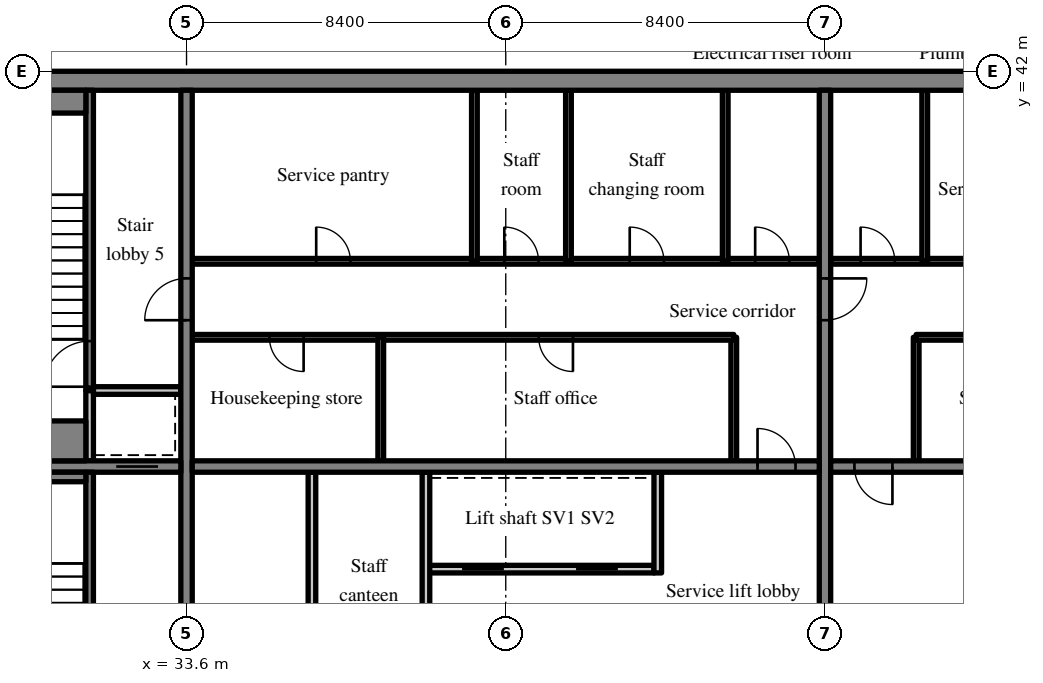
"""IFC4 building model, lengths in metres.
Left out: names, types, materials, properties, quantities, classifications, styles, units other than length and angle.
Written with IfcOpenShell. Run it as: python <this file> out.ifc"""

import sys

from ifc_helpers import new_model, si_unit, direction, frame, frame_2d, origin, place, context, subcontext, project, spatial, rectangle, extrude, source, transform, mapped, element, fill, save


model = new_model("IFC4")
c1 = context("Model", 3, precision=1e-05, world=origin(), true_north=direction((0.0, 1.0)))
c2 = subcontext(c1, "Body", "Model", "MODEL_VIEW")
j1 = project(units=[si_unit("LENGTHUNIT", "METRE"), si_unit("PLANEANGLEUNIT", "RADIAN")], contexts=[c1])
p1 = place(None, origin())
s1 = spatial("IfcSite", under=j1, at=p1, CompositionType="ELEMENT")
p2 = place(p1, origin())
s2 = spatial("IfcBuilding", under=s1, at=p2, CompositionType="ELEMENT")
p3 = place(p2, frame((0.0, 0.0, 289.7)))
s3 = spatial("IfcBuildingStorey", under=s2, at=p3, CompositionType="ELEMENT", Elevation=289.7)
m1 = source(origin(), c2, "Body", "SweptSolid", [
    extrude(rectangle(XDim=50.4, YDim=0.5, at=frame_2d((25.2, 0.0))), origin(), (0.0, 0.0, 1.0), 3.72),
])
p4 = place(p3, frame((25.2, 41.75, 0.0), z_axis=(0.0, 0.0, 1.0), x_axis=(1.0, 0.0, 0.0)))
e1 = element("IfcWall", 1, at=p4, inside=s3, PredefinedType="SHEAR", context=c2, shape_type="MappedRepresentation", body=[
    mapped(m1, transform((0.0, 0.0, 0.0), scale=1.0)),
])
m2 = source(origin(), c2, "Body", "SweptSolid", [
    extrude(rectangle(XDim=19.0, YDim=0.3, at=frame_2d((9.5, 0.0))), origin(), (0.0, 0.0, 1.0), 3.72),
])
p5 = place(p3, frame((33.6, 22.5, 0.0), z_axis=(0.0, 0.0, 1.0), x_axis=(0.0, 1.0, 0.0)))
e2 = element("IfcWall", 2, at=p5, inside=s3, PredefinedType="SHEAR", context=c2, shape_type="MappedRepresentation", body=[
    mapped(m2, transform((0.0, 0.0, 0.0), scale=1.0)),
])
m3 = source(origin(), c2, "Body", "SweptSolid", [
    extrude(rectangle(XDim=1.1, YDim=2.1, at=frame_2d((0.55, 1.05))), frame((0.0, 0.16, 0.0), z_axis=(0.0, -1.0, 0.0), x_axis=(1.0, 0.0, 0.0)), (0.0, 0.0, 1.0), 0.32),
])
p6 = place(p5, frame((12.95, 0.0, 0.0)))
e3 = element("IfcOpeningElement", 3, at=p6, cuts=e2, PredefinedType="OPENING", context=c2, shape_type="MappedRepresentation", body=[
    mapped(m3, transform((0.0, 0.0, 0.0), scale=1.0)),
])
p7 = place(p3, frame((50.4, 22.5, 0.0), z_axis=(0.0, 0.0, 1.0), x_axis=(0.0, 1.0, 0.0)))
e4 = element("IfcWall", 4, at=p7, inside=s3, PredefinedType="SHEAR", context=c2, shape_type="MappedRepresentation", body=[
    mapped(m2, transform((0.0, 0.0, 0.0), scale=1.0)),
])
p8 = place(p7, frame((12.95, 0.0, 0.0)))
e5 = element("IfcOpeningElement", 5, at=p8, cuts=e4, PredefinedType="OPENING", context=c2, shape_type="MappedRepresentation", body=[
    mapped(m3, transform((0.0, 0.0, 0.0), scale=1.0)),
])
m4 = source(origin(), c2, "Body", "SweptSolid", [
    extrude(rectangle(XDim=7.75, YDim=0.3, at=frame_2d((3.875, 0.0))), origin(), (0.0, 0.0, 1.0), 3.72),
])
p9 = place(p3, frame((25.7, 31.6, 0.0), z_axis=(0.0, 0.0, 1.0), x_axis=(1.0, 0.0, 0.0)))
e6 = element("IfcWall", 6, at=p9, inside=s3, PredefinedType="SHEAR", context=c2, shape_type="MappedRepresentation", body=[
    mapped(m4, transform((0.0, 0.0, 0.0), scale=1.0)),
])
p10 = place(p9, frame((6.05, 0.0, 0.0)))
e7 = element("IfcOpeningElement", 7, at=p10, cuts=e6, PredefinedType="OPENING", context=c2, shape_type="MappedRepresentation", body=[
    mapped(m3, transform((0.0, 0.0, 0.0), scale=1.0)),
])
m5 = source(origin(), c2, "Body", "SweptSolid", [
    extrude(rectangle(XDim=16.5, YDim=0.3, at=frame_2d((8.25, 0.0))), origin(), (0.0, 0.0, 1.0), 3.72),
])
p11 = place(p3, frame((33.75, 31.6, 0.0), z_axis=(0.0, 0.0, 1.0), x_axis=(1.0, 0.0, 0.0)))
e8 = element("IfcWall", 8, at=p11, inside=s3, PredefinedType="SHEAR", context=c2, shape_type="MappedRepresentation", body=[
    mapped(m5, transform((0.0, 0.0, 0.0), scale=1.0)),
])
m6 = source(origin(), c2, "Body", "SweptSolid", [
    extrude(rectangle(XDim=1.0, YDim=2.1, at=frame_2d((0.5, 1.05))), frame((0.0, 0.16, 0.0), z_axis=(0.0, -1.0, 0.0), x_axis=(1.0, 0.0, 0.0)), (0.0, 0.0, 1.0), 0.32),
])
p12 = place(p11, frame((14.875, 0.0, 0.0)))
e9 = element("IfcOpeningElement", 9, at=p12, cuts=e8, PredefinedType="OPENING", context=c2, shape_type="MappedRepresentation", body=[
    mapped(m6, transform((0.0, 0.0, 0.0), scale=1.0)),
])
p13 = place(p3, frame((50.55, 31.6, 0.0), z_axis=(0.0, 0.0, 1.0), x_axis=(1.0, 0.0, 0.0)))
e10 = element("IfcWall", 10, at=p13, inside=s3, PredefinedType="SHEAR", context=c2, shape_type="MappedRepresentation", body=[
    mapped(m5, transform((0.0, 0.0, 0.0), scale=1.0)),
])
p14 = place(p13, frame((0.625, 0.0, 0.0)))
e11 = element("IfcOpeningElement", 11, at=p14, cuts=e10, PredefinedType="OPENING", context=c2, shape_type="MappedRepresentation", body=[
    mapped(m6, transform((0.0, 0.0, 0.0), scale=1.0)),
])
m7 = source(origin(), c2, "Body", "SweptSolid", [
    extrude(rectangle(XDim=6.0, YDim=0.2, at=frame_2d((3.0, 0.0))), origin(), (0.0, 0.0, 1.0), 3.72),
])
p15 = place(p3, frame((39.9, 28.9, 0.0), z_axis=(0.0, 0.0, 1.0), x_axis=(1.0, 0.0, 0.0)))
e12 = element("IfcWall", 12, at=p15, inside=s3, PredefinedType="SOLIDWALL", context=c2, shape_type="MappedRepresentation", body=[
    mapped(m7, transform((0.0, 0.0, 0.0), scale=1.0)),
])
m8 = source(origin(), c2, "Body", "SweptSolid", [
    extrude(rectangle(XDim=1.1, YDim=2.1, at=frame_2d((0.55, 1.05))), frame((0.0, 0.11, 0.0), z_axis=(0.0, -1.0, 0.0), x_axis=(1.0, 0.0, 0.0)), (0.0, 0.0, 1.0), 0.22),
])
p16 = place(p15, frame((0.95, 0.0, 0.0)))
e13 = element("IfcOpeningElement", 13, at=p16, cuts=e12, PredefinedType="OPENING", context=c2, shape_type="MappedRepresentation", body=[
    mapped(m8, transform((0.0, 0.0, 0.0), scale=1.0)),
])
p17 = place(p15, frame((3.95, 0.0, 0.0)))
e14 = element("IfcOpeningElement", 14, at=p17, cuts=e12, PredefinedType="OPENING", context=c2, shape_type="MappedRepresentation", body=[
    mapped(m8, transform((0.0, 0.0, 0.0), scale=1.0)),
])
m9 = source(origin(), c2, "Body", "SweptSolid", [
    extrude(rectangle(XDim=8.95, YDim=0.2, at=frame_2d((4.475, 0.0))), origin(), (0.0, 0.0, 1.0), 3.72),
])
p18 = place(p3, frame((39.9, 22.5, 0.0), z_axis=(0.0, 0.0, 1.0), x_axis=(0.0, 1.0, 0.0)))
e15 = element("IfcWall", 15, at=p18, inside=s3, PredefinedType="PARTITIONING", context=c2, shape_type="MappedRepresentation", body=[
    mapped(m9, transform((0.0, 0.0, 0.0), scale=1.0)),
])
m10 = source(origin(), c2, "Body", "SweptSolid", [
    extrude(rectangle(XDim=0.9, YDim=2.1, at=frame_2d((0.45, 1.05))), frame((0.0, 0.11, 0.0), z_axis=(0.0, -1.0, 0.0), x_axis=(1.0, 0.0, 0.0)), (0.0, 0.0, 1.0), 0.22),
])
p19 = place(p18, frame((4.05, 0.0, 0.0)))
e16 = element("IfcOpeningElement", 16, at=p19, cuts=e15, PredefinedType="OPENING", context=c2, shape_type="MappedRepresentation", body=[
    mapped(m10, transform((0.0, 0.0, 0.0), scale=1.0)),
])
m11 = source(origin(), c2, "Body", "SweptSolid", [
    extrude(rectangle(XDim=2.65, YDim=0.2, at=frame_2d((1.325, 0.0))), origin(), (0.0, 0.0, 1.0), 3.72),
])
p20 = place(p3, frame((46.0, 28.8, 0.0), z_axis=(0.0, 0.0, 1.0), x_axis=(0.0, 1.0, 0.0)))
e17 = element("IfcWall", 17, at=p20, inside=s3, PredefinedType="SOLIDWALL", context=c2, shape_type="MappedRepresentation", body=[
    mapped(m11, transform((0.0, 0.0, 0.0), scale=1.0)),
])
p21 = place(p3, frame((36.9, 22.5, 0.0), z_axis=(0.0, 0.0, 1.0), x_axis=(0.0, 1.0, 0.0)))
e18 = element("IfcWall", 18, at=p21, inside=s3, PredefinedType="PARTITIONING", context=c2, shape_type="MappedRepresentation", body=[
    mapped(m9, transform((0.0, 0.0, 0.0), scale=1.0)),
])
m12 = source(origin(), c2, "Body", "SweptSolid", [
    extrude(rectangle(XDim=3.25, YDim=0.15, at=frame_2d((1.625, 0.0))), origin(), (0.0, 0.0, 1.0), 3.72),
])
p22 = place(p3, frame((48.0, 31.75, 0.0), z_axis=(0.0, 0.0, 1.0), x_axis=(0.0, 1.0, 0.0)))
e19 = element("IfcWall", 19, at=p22, inside=s3, PredefinedType="PARTITIONING", context=c2, shape_type="MappedRepresentation", body=[
    mapped(m12, transform((0.0, 0.0, 0.0), scale=1.0)),
])
m13 = source(origin(), c2, "Body", "SweptSolid", [
    extrude(rectangle(XDim=14.25, YDim=0.15, at=frame_2d((7.125, 0.0))), origin(), (0.0, 0.0, 1.0), 3.72),
])
p23 = place(p3, frame((33.75, 35.0, 0.0), z_axis=(0.0, 0.0, 1.0), x_axis=(1.0, 0.0, 0.0)))
e20 = element("IfcWall", 20, at=p23, inside=s3, PredefinedType="PARTITIONING", context=c2, shape_type="MappedRepresentation", body=[
    mapped(m13, transform((0.0, 0.0, 0.0), scale=1.0)),
])
m14 = source(origin(), c2, "Body", "SweptSolid", [
    extrude(rectangle(XDim=0.9, YDim=2.1, at=frame_2d((0.45, 1.05))), frame((0.0, 0.085, 0.0), z_axis=(0.0, -1.0, 0.0), x_axis=(1.0, 0.0, 0.0)), (0.0, 0.0, 1.0), 0.17),
])
p24 = place(p23, frame((2.031, 0.0, 0.0)))
e21 = element("IfcOpeningElement", 21, at=p24, cuts=e20, PredefinedType="OPENING", context=c2, shape_type="MappedRepresentation", body=[
    mapped(m14, transform((0.0, 0.0, 0.0), scale=1.0)),
])
p25 = place(p23, frame((9.118, 0.0, 0.0)))
e22 = element("IfcOpeningElement", 22, at=p25, cuts=e20, PredefinedType="OPENING", context=c2, shape_type="MappedRepresentation", body=[
    mapped(m14, transform((0.0, 0.0, 0.0), scale=1.0)),
])
m15 = source(origin(), c2, "Body", "SweptSolid", [
    extrude(rectangle(XDim=16.5, YDim=0.15, at=frame_2d((8.25, 0.0))), origin(), (0.0, 0.0, 1.0), 3.72),
])
p26 = place(p3, frame((33.75, 37.0, 0.0), z_axis=(0.0, 0.0, 1.0), x_axis=(1.0, 0.0, 0.0)))
e23 = element("IfcWall", 23, at=p26, inside=s3, PredefinedType="PARTITIONING", context=c2, shape_type="MappedRepresentation", body=[
    mapped(m15, transform((0.0, 0.0, 0.0), scale=1.0)),
])
p27 = place(p26, frame((3.262, 0.0, 0.0)))
e24 = element("IfcOpeningElement", 24, at=p27, cuts=e23, PredefinedType="OPENING", context=c2, shape_type="MappedRepresentation", body=[
    mapped(m14, transform((0.0, 0.0, 0.0), scale=1.0)),
])
p28 = place(p26, frame((8.212, 0.0, 0.0)))
e25 = element("IfcOpeningElement", 25, at=p28, cuts=e23, PredefinedType="OPENING", context=c2, shape_type="MappedRepresentation", body=[
    mapped(m14, transform((0.0, 0.0, 0.0), scale=1.0)),
])
p29 = place(p26, frame((11.512, 0.0, 0.0)))
e26 = element("IfcOpeningElement", 26, at=p29, cuts=e23, PredefinedType="OPENING", context=c2, shape_type="MappedRepresentation", body=[
    mapped(m14, transform((0.0, 0.0, 0.0), scale=1.0)),
])
p30 = place(p26, frame((14.813, 0.0, 0.0)))
e27 = element("IfcOpeningElement", 27, at=p30, cuts=e23, PredefinedType="OPENING", context=c2, shape_type="MappedRepresentation", body=[
    mapped(m14, transform((0.0, 0.0, 0.0), scale=1.0)),
])
p31 = place(p3, frame((38.711, 31.75, 0.0), z_axis=(0.0, 0.0, 1.0), x_axis=(0.0, 1.0, 0.0)))
e28 = element("IfcWall", 28, at=p31, inside=s3, PredefinedType="PARTITIONING", context=c2, shape_type="MappedRepresentation", body=[
    mapped(m12, transform((0.0, 0.0, 0.0), scale=1.0)),
])
m16 = source(origin(), c2, "Body", "SweptSolid", [
    extrude(rectangle(XDim=4.5, YDim=0.15, at=frame_2d((2.25, 0.0))), origin(), (0.0, 0.0, 1.0), 3.72),
])
for number, where, z_axis, x_axis in (
    (29, (41.175, 37.0, 0.0), (0.0, 0.0, 1.0), (0.0, 1.0, 0.0)),
    (30, (43.65, 37.0, 0.0), (0.0, 0.0, 1.0), (0.0, 1.0, 0.0)),
    (31, (47.775, 37.0, 0.0), (0.0, 0.0, 1.0), (0.0, 1.0, 0.0)),
):
    element("IfcWall", number, at=place(p3, frame(where, z_axis=z_axis, x_axis=x_axis)), inside=s3, PredefinedType="PARTITIONING", context=c2, shape_type="MappedRepresentation", body=[
        mapped(m16, transform((0.0, 0.0, 0.0), scale=1.0)),
    ])
p32 = place(p3, frame((52.8, 31.75, 0.0), z_axis=(0.0, 0.0, 1.0), x_axis=(0.0, 1.0, 0.0)))
e32 = element("IfcWall", 32, at=p32, inside=s3, PredefinedType="PARTITIONING", context=c2, shape_type="MappedRepresentation", body=[
    mapped(m12, transform((0.0, 0.0, 0.0), scale=1.0)),
])
p33 = place(p3, frame((67.05, 35.0, 0.0), z_axis=(0.0, 0.0, 1.0), x_axis=(-1.0, 0.0, 0.0)))
e33 = element("IfcWall", 33, at=p33, inside=s3, PredefinedType="PARTITIONING", context=c2, shape_type="MappedRepresentation", body=[
    mapped(m13, transform((0.0, 0.0, 0.0), scale=1.0)),
])
p34 = place(p33, frame((0.968, 0.0, 0.0)))
e34 = element("IfcOpeningElement", 34, at=p34, cuts=e33, PredefinedType="OPENING", context=c2, shape_type="MappedRepresentation", body=[
    mapped(m14, transform((0.0, 0.0, 0.0), scale=1.0)),
])
p35 = place(p33, frame((5.929, 0.0, 0.0)))
e35 = element("IfcOpeningElement", 35, at=p35, cuts=e33, PredefinedType="OPENING", context=c2, shape_type="MappedRepresentation", body=[
    mapped(m14, transform((0.0, 0.0, 0.0), scale=1.0)),
])
p36 = place(p33, frame((11.599, 0.0, 0.0)))
e36 = element("IfcOpeningElement", 36, at=p36, cuts=e33, PredefinedType="OPENING", context=c2, shape_type="MappedRepresentation", body=[
    mapped(m14, transform((0.0, 0.0, 0.0), scale=1.0)),
])
p37 = place(p3, frame((67.05, 37.0, 0.0), z_axis=(0.0, 0.0, 1.0), x_axis=(-1.0, 0.0, 0.0)))
e37 = element("IfcWall", 37, at=p37, inside=s3, PredefinedType="PARTITIONING", context=c2, shape_type="MappedRepresentation", body=[
    mapped(m15, transform((0.0, 0.0, 0.0), scale=1.0)),
])
p38 = place(p37, frame((0.788, 0.0, 0.0)))
e38 = element("IfcOpeningElement", 38, at=p38, cuts=e37, PredefinedType="OPENING", context=c2, shape_type="MappedRepresentation", body=[
    mapped(m14, transform((0.0, 0.0, 0.0), scale=1.0)),
])
p39 = place(p37, frame((3.675, 0.0, 0.0)))
e39 = element("IfcOpeningElement", 39, at=p39, cuts=e37, PredefinedType="OPENING", context=c2, shape_type="MappedRepresentation", body=[
    mapped(m14, transform((0.0, 0.0, 0.0), scale=1.0)),
])
p40 = place(p37, frame((9.45, 0.0, 0.0)))
e40 = element("IfcOpeningElement", 40, at=p40, cuts=e37, PredefinedType="OPENING", context=c2, shape_type="MappedRepresentation", body=[
    mapped(m14, transform((0.0, 0.0, 0.0), scale=1.0)),
])
p41 = place(p37, frame((14.813, 0.0, 0.0)))
e41 = element("IfcOpeningElement", 41, at=p41, cuts=e37, PredefinedType="OPENING", context=c2, shape_type="MappedRepresentation", body=[
    mapped(m14, transform((0.0, 0.0, 0.0), scale=1.0)),
])
p42 = place(p3, frame((53.025, 37.0, 0.0), z_axis=(0.0, 0.0, 1.0), x_axis=(0.0, 1.0, 0.0)))
e42 = element("IfcWall", 42, at=p42, inside=s3, PredefinedType="PARTITIONING", context=c2, shape_type="MappedRepresentation", body=[
    mapped(m16, transform((0.0, 0.0, 0.0), scale=1.0)),
])
m17 = source(origin(), c2, "Body", "SweptSolid", [
    extrude(rectangle(XDim=8.95, YDim=0.2, at=frame_2d((4.475, 0.0))), origin(), (0.0, 0.0, 1.0), 3.72),
])
p43 = place(p3, frame((31.05, 22.5, 0.0), z_axis=(0.0, 0.0, 1.0), x_axis=(0.0, 1.0, 0.0)))
e43 = element("IfcWall", 43, at=p43, inside=s3, PredefinedType="SOLIDWALL", context=c2, shape_type="MappedRepresentation", body=[
    mapped(m17, transform((0.0, 0.0, 0.0), scale=1.0)),
])
m18 = source(origin(), c2, "Body", "SweptSolid", [
    extrude(rectangle(XDim=1.2, YDim=2.1, at=frame_2d((0.6, 1.05))), frame((0.0, 0.11, 0.0), z_axis=(0.0, -1.0, 0.0), x_axis=(1.0, 0.0, 0.0)), (0.0, 0.0, 1.0), 0.22),
])
p44 = place(p43, frame((1.1, 0.0, 0.0)))
e44 = element("IfcOpeningElement", 44, at=p44, cuts=e43, PredefinedType="OPENING", context=c2, shape_type="MappedRepresentation", body=[
    mapped(m18, transform((0.0, 0.0, 0.0), scale=1.0)),
])
m19 = source(origin(), c2, "Body", "SweptSolid", [
    extrude(rectangle(XDim=1.85, YDim=0.2, at=frame_2d((0.925, 0.0))), origin(), (0.0, 0.0, 1.0), 3.72),
])
p45 = place(p3, frame((31.05, 31.75, 0.0), z_axis=(0.0, 0.0, 1.0), x_axis=(0.0, 1.0, 0.0)))
e45 = element("IfcWall", 45, at=p45, inside=s3, PredefinedType="SOLIDWALL", context=c2, shape_type="MappedRepresentation", body=[
    mapped(m19, transform((0.0, 0.0, 0.0), scale=1.0)),
])
m20 = source(origin(), c2, "Body", "SweptSolid", [
    extrude(rectangle(XDim=2.3, YDim=0.2, at=frame_2d((1.15, 0.0))), origin(), (0.0, 0.0, 1.0), 3.72),
])
p46 = place(p3, frame((31.15, 33.6, 0.0), z_axis=(0.0, 0.0, 1.0), x_axis=(1.0, 0.0, 0.0)))
e46 = element("IfcWall", 46, at=p46, inside=s3, PredefinedType="SOLIDWALL", context=c2, shape_type="MappedRepresentation", body=[
    mapped(m20, transform((0.0, 0.0, 0.0), scale=1.0)),
])
m21 = source(origin(), c2, "Body", "SweptSolid", [
    extrude(rectangle(XDim=7.9, YDim=0.2, at=frame_2d((3.95, 0.0))), origin(), (0.0, 0.0, 1.0), 3.72),
])
p47 = place(p3, frame((31.05, 33.6, 0.0), z_axis=(0.0, 0.0, 1.0), x_axis=(0.0, 1.0, 0.0)))
e47 = element("IfcWall", 47, at=p47, inside=s3, PredefinedType="SOLIDWALL", context=c2, shape_type="MappedRepresentation", body=[
    mapped(m21, transform((0.0, 0.0, 0.0), scale=1.0)),
])
p48 = place(p47, frame((0.1, 0.0, 0.0)))
e48 = element("IfcOpeningElement", 48, at=p48, cuts=e47, PredefinedType="OPENING", context=c2, shape_type="MappedRepresentation", body=[
    mapped(m18, transform((0.0, 0.0, 0.0), scale=1.0)),
])
m22 = source(origin(), c2, "Body", "SweptSolid", [
    extrude(rectangle(XDim=5.25, YDim=0.25, at=frame_2d((2.625, 0.0))), origin(), (0.0, 0.0, 1.0), 3.72),
])
p49 = place(p3, frame((25.7, 31.325, 0.0), z_axis=(0.0, 0.0, 1.0), x_axis=(1.0, 0.0, 0.0)))
e49 = element("IfcWall", 49, at=p49, inside=s3, PredefinedType="SOLIDWALL", context=c2, shape_type="MappedRepresentation", body=[
    mapped(m22, transform((0.0, 0.0, 0.0), scale=1.0)),
])
m23 = source(origin(), c2, "Body", "SweptSolid", [
    extrude(rectangle(XDim=5.25, YDim=0.6, at=frame_2d((2.625, 0.0))), origin(), (0.0, 0.0, 1.0), 3.72),
])
p50 = place(p3, frame((25.7, 41.2, 0.0), z_axis=(0.0, 0.0, 1.0), x_axis=(1.0, 0.0, 0.0)))
e50 = element("IfcWall", 50, at=p50, inside=s3, PredefinedType="SOLIDWALL", context=c2, shape_type="MappedRepresentation", body=[
    mapped(m23, transform((0.0, 0.0, 0.0), scale=1.0)),
])
m24 = source(origin(), c2, "Body", "SweptSolid", [
    extrude(rectangle(XDim=5.25, YDim=1.05, at=frame_2d((2.625, 0.0))), origin(), (0.0, 0.0, 1.0), 3.72),
])
p51 = place(p3, frame((25.7, 32.275, 0.0), z_axis=(0.0, 0.0, 1.0), x_axis=(1.0, 0.0, 0.0)))
e51 = element("IfcWall", 51, at=p51, inside=s3, PredefinedType="SOLIDWALL", context=c2, shape_type="MappedRepresentation", body=[
    mapped(m24, transform((0.0, 0.0, 0.0), scale=1.0)),
])
m25 = source(origin(), c2, "Body", "SweptSolid", [
    extrude(rectangle(XDim=1.0, YDim=2.1, at=frame_2d((0.5, 1.05))), frame((0.0, 0.025, 0.0), z_axis=(0.0, -1.0, 0.0), x_axis=(1.0, 0.0, 0.0)), (0.0, 0.0, 1.0), 0.05),
])
p52 = place(p12, origin())
e52 = element("IfcDoor", 52, at=p52, inside=s3, OperationType="SINGLE_SWING_LEFT", PredefinedType="DOOR", context=c2, shape_type="MappedRepresentation", body=[
    mapped(m25, transform((0.0, 0.0, 0.0), scale=1.0)),
])
fill(e9, e52)
m26 = source(origin(), c2, "Body", "SweptSolid", [
    extrude(rectangle(XDim=1.1, YDim=2.1, at=frame_2d((0.55, 1.05))), frame((0.0, 0.025, 0.0), z_axis=(0.0, -1.0, 0.0), x_axis=(1.0, 0.0, 0.0)), (0.0, 0.0, 1.0), 0.05),
])
p53 = place(p16, origin())
e53 = element("IfcDoor", 53, at=p53, inside=s3, OperationType="SLIDING_TO_LEFT", PredefinedType="DOOR", context=c2, shape_type="MappedRepresentation", body=[
    mapped(m26, transform((0.0, 0.0, 0.0), scale=1.0)),
])
fill(e13, e53)
p54 = place(p17, origin())
e54 = element("IfcDoor", 54, at=p54, inside=s3, OperationType="SLIDING_TO_RIGHT", PredefinedType="DOOR", context=c2, shape_type="MappedRepresentation", body=[
    mapped(m26, transform((0.0, 0.0, 0.0), scale=1.0)),
])
fill(e14, e54)
m27 = source(origin(), c2, "Body", "SweptSolid", [
    extrude(rectangle(XDim=0.9, YDim=2.1, at=frame_2d((0.45, 1.05))), frame((0.0, 0.025, 0.0), z_axis=(0.0, -1.0, 0.0), x_axis=(1.0, 0.0, 0.0)), (0.0, 0.0, 1.0), 0.05),
])
p55 = place(p24, origin())
e55 = element("IfcDoor", 55, at=p55, inside=s3, OperationType="SINGLE_SWING_RIGHT", PredefinedType="DOOR", context=c2, shape_type="MappedRepresentation", body=[
    mapped(m27, transform((0.0, 0.0, 0.0), scale=1.0)),
])
fill(e21, e55)
p56 = place(p25, origin())
e56 = element("IfcDoor", 56, at=p56, inside=s3, OperationType="SINGLE_SWING_RIGHT", PredefinedType="DOOR", context=c2, shape_type="MappedRepresentation", body=[
    mapped(m27, transform((0.0, 0.0, 0.0), scale=1.0)),
])
fill(e22, e56)
p57 = place(p27, origin())
e57 = element("IfcDoor", 57, at=p57, inside=s3, OperationType="SINGLE_SWING_LEFT", PredefinedType="DOOR", context=c2, shape_type="MappedRepresentation", body=[
    mapped(m27, transform((0.0, 0.0, 0.0), scale=1.0)),
])
fill(e24, e57)
p58 = place(p28, origin())
e58 = element("IfcDoor", 58, at=p58, inside=s3, OperationType="SINGLE_SWING_LEFT", PredefinedType="DOOR", context=c2, shape_type="MappedRepresentation", body=[
    mapped(m27, transform((0.0, 0.0, 0.0), scale=1.0)),
])
fill(e25, e58)
p59 = place(p29, origin())
e59 = element("IfcDoor", 59, at=p59, inside=s3, OperationType="SINGLE_SWING_LEFT", PredefinedType="DOOR", context=c2, shape_type="MappedRepresentation", body=[
    mapped(m27, transform((0.0, 0.0, 0.0), scale=1.0)),
])
fill(e26, e59)
p60 = place(p30, origin())
e60 = element("IfcDoor", 60, at=p60, inside=s3, OperationType="SINGLE_SWING_LEFT", PredefinedType="DOOR", context=c2, shape_type="MappedRepresentation", body=[
    mapped(m27, transform((0.0, 0.0, 0.0), scale=1.0)),
])
fill(e27, e60)
p61 = place(p14, origin())
e61 = element("IfcDoor", 61, at=p61, inside=s3, OperationType="SINGLE_SWING_RIGHT", PredefinedType="DOOR", context=c2, shape_type="MappedRepresentation", body=[
    mapped(m25, transform((0.0, 0.0, 0.0), scale=1.0)),
])
fill(e11, e61)
p62 = place(p41, origin())
e62 = element("IfcDoor", 62, at=p62, inside=s3, OperationType="SINGLE_SWING_RIGHT", PredefinedType="DOOR", context=c2, shape_type="MappedRepresentation", body=[
    mapped(m27, transform((0.0, 0.0, 0.0), scale=1.0)),
])
fill(e41, e62)
p63 = place(p10, origin())
e63 = element("IfcDoor", 63, at=p63, inside=s3, OperationType="SLIDING_TO_LEFT", PredefinedType="DOOR", context=c2, shape_type="MappedRepresentation", body=[
    mapped(m26, transform((0.0, 0.0, 0.0), scale=1.0)),
])
fill(e7, e63)
m28 = source(origin(), c2, "Body", "SweptSolid", [
    extrude(rectangle(XDim=1.2, YDim=2.1, at=frame_2d((0.6, 1.05))), frame((0.0, 0.025, 0.0), z_axis=(0.0, -1.0, 0.0), x_axis=(1.0, 0.0, 0.0)), (0.0, 0.0, 1.0), 0.05),
])
p64 = place(p48, origin())
e64 = element("IfcDoor", 64, at=p64, inside=s3, OperationType="SINGLE_SWING_LEFT", PredefinedType="DOOR", context=c2, shape_type="MappedRepresentation", body=[
    mapped(m28, transform((0.0, 0.0, 0.0), scale=1.0)),
])
fill(e48, e64)
p65 = place(p6, origin())
e65 = element("IfcDoor", 65, at=p65, inside=s3, OperationType="SINGLE_SWING_LEFT", PredefinedType="DOOR", context=c2, shape_type="MappedRepresentation", body=[
    mapped(m26, transform((0.0, 0.0, 0.0), scale=1.0)),
])
fill(e3, e65)
p66 = place(p8, origin())
e66 = element("IfcDoor", 66, at=p66, inside=s3, OperationType="SINGLE_SWING_RIGHT", PredefinedType="DOOR", context=c2, shape_type="MappedRepresentation", body=[
    mapped(m26, transform((0.0, 0.0, 0.0), scale=1.0)),
])
fill(e5, e66)
save(model, sys.argv[1])
